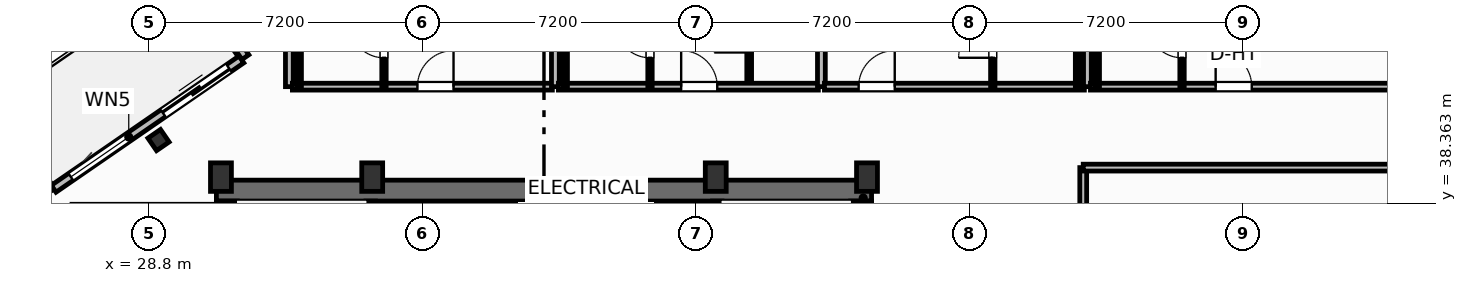
"""IFC4 building model, lengths in metres.
Left out: names, types, materials, properties, quantities, classifications, styles, units other than length and angle.
Written with IfcOpenShell. Run it as: python <this file> out.ifc"""

import sys

from ifc_helpers import new_model, si_unit, direction, frame, frame_2d, origin, origin_2d, place, context, subcontext, project, spatial, rectangle, i_section, extrude, element, fill, save


model = new_model("IFC4")
c1 = context("Model", 3, precision=1e-05, world=origin(), true_north=direction((0.0, 1.0)))
c2 = subcontext(c1, "Body", "Model", "MODEL_VIEW")
j1 = project(units=[si_unit("LENGTHUNIT", "METRE"), si_unit("PLANEANGLEUNIT", "RADIAN")], contexts=[c1])
p1 = place(None, origin())
s1 = spatial("IfcSite", under=j1, at=p1, CompositionType="ELEMENT")
p2 = place(p1, origin())
s2 = spatial("IfcBuilding", under=s1, at=p2, CompositionType="ELEMENT")
p3 = place(p2, frame((0.0, 0.0, 280.4)))
s3 = spatial("IfcBuildingStorey", under=s2, at=p3, CompositionType="ELEMENT", Elevation=280.4)
for number, where, z_axis, x_axis in (
    (1, (30.7, 39.05, 0.0), (0.0, 0.0, 1.0), (1.0, 0.0, 0.0)),
    (2, (34.68, 39.05, 0.0), (0.0, 0.0, 1.0), (1.0, 0.0, 0.0)),
    (3, (43.72, 39.05, 0.0), (0.0, 0.0, 1.0), (1.0, 0.0, 0.0)),
    (4, (47.7, 39.05, 0.0), (0.0, 0.0, 1.0), (1.0, 0.0, 0.0)),
):
    element("IfcColumn", number, at=place(p3, frame(where, z_axis=z_axis, x_axis=x_axis)), inside=s3, PredefinedType="COLUMN", context=c2, shape_type="SweptSolid", body=[
        extrude(rectangle(XDim=0.55, YDim=0.75, at=origin_2d()), origin(), (0.0, 0.0, 1.0), 3.7),
    ])
p4 = place(p3, frame((30.58, 38.695, 0.0), z_axis=(0.0, 0.0, 1.0), x_axis=(1.0, 0.0, 0.0)))
e5 = element("IfcWall", 5, at=p4, inside=s3, PredefinedType="SHEAR", context=c2, shape_type="SweptSolid", body=[
    extrude(rectangle(XDim=17.24, YDim=0.55, at=frame_2d((8.62, 0.0))), origin(), (0.0, 0.0, 1.0), 3.45),
])
for number, where, z_axis, x_axis in (
    (6, (30.855, 29.2, 0.0), (0.0, 0.0, 1.0), (0.0, 1.0, 0.0)),
    (7, (47.545, 29.2, 0.0), (0.0, 0.0, 1.0), (0.0, 1.0, 0.0)),
):
    element("IfcWall", number, at=place(p3, frame(where, z_axis=z_axis, x_axis=x_axis)), inside=s3, PredefinedType="SHEAR", context=c2, shape_type="SweptSolid", body=[
        extrude(rectangle(XDim=9.22, YDim=0.55, at=frame_2d((4.61, 0.0))), origin(), (0.0, 0.0, 1.0), 3.45),
    ])
p5 = place(p3, frame((34.64, 29.2, 0.0), z_axis=(0.0, 0.0, 1.0), x_axis=(0.0, 1.0, 0.0)))
e8 = element("IfcWall", 8, at=p5, inside=s3, PredefinedType="SHEAR", context=c2, shape_type="SweptSolid", body=[
    extrude(rectangle(XDim=9.22, YDim=0.25, at=frame_2d((4.61, 0.0))), origin(), (0.0, 0.0, 1.0), 3.45),
])
p6 = place(p5, frame((0.65, 0.0, 0.0)))
e9 = element("IfcOpeningElement", 9, at=p6, cuts=e8, PredefinedType="OPENING", context=c2, shape_type="SweptSolid", body=[
    extrude(rectangle(XDim=1.05, YDim=2.15, at=frame_2d((0.525, 1.075))), frame((0.0, 0.135, 0.0), z_axis=(0.0, -1.0, 0.0), x_axis=(1.0, 0.0, 0.0)), (0.0, 0.0, 1.0), 0.27),
])
p7 = place(p3, frame((43.76, 29.2, 0.0), z_axis=(0.0, 0.0, 1.0), x_axis=(0.0, 1.0, 0.0)))
e10 = element("IfcWall", 10, at=p7, inside=s3, PredefinedType="SHEAR", context=c2, shape_type="SweptSolid", body=[
    extrude(rectangle(XDim=9.22, YDim=0.25, at=frame_2d((4.61, 0.0))), origin(), (0.0, 0.0, 1.0), 3.45),
])
p8 = place(p7, frame((0.65, 0.0, 0.0)))
e11 = element("IfcOpeningElement", 11, at=p8, cuts=e10, PredefinedType="OPENING", context=c2, shape_type="SweptSolid", body=[
    extrude(rectangle(XDim=1.05, YDim=2.15, at=frame_2d((0.525, 1.075))), frame((0.0, 0.135, 0.0), z_axis=(0.0, -1.0, 0.0), x_axis=(1.0, 0.0, 0.0)), (0.0, 0.0, 1.0), 0.27),
])
p9 = place(p3, frame((29.057, 40.025, 0.0), z_axis=(0.0, 0.0, 1.0), x_axis=(0.823532597628, 0.567268949127, 0.0)))
e12 = element("IfcColumn", 12, at=p9, inside=s3, PredefinedType="COLUMN", context=c2, shape_type="SweptSolid", body=[
    extrude(i_section(OverallWidth=0.401, OverallDepth=0.399, WebThickness=0.025, FlangeThickness=0.04, FilletRadius=0.022, at=origin_2d()), origin(), (0.0, 0.0, 1.0), 3.7),
])
p10 = place(p3, frame((26.297, 38.743, 0.0), z_axis=(0.0, 0.0, 1.0), x_axis=(0.823534636215, 0.567265989598, 0.0)))
e13 = element("IfcWall", 13, at=p10, inside=s3, PredefinedType="SOLIDWALL", context=c2, shape_type="SweptSolid", body=[
    extrude(rectangle(XDim=6.0, YDim=0.22, at=frame_2d((3.0, 0.0))), origin(), (0.0, 0.0, 1.0), 2.73),
])
p11 = place(p10, frame((3.5, 0.0, 0.0)))
e14 = element("IfcOpeningElement", 14, at=p11, cuts=e13, PredefinedType="OPENING", context=c2, shape_type="SweptSolid", body=[
    extrude(rectangle(XDim=2.1, YDim=2.3, at=frame_2d((1.05, 1.15))), frame((0.0, 0.12, 0.0), z_axis=(0.0, -1.0, 0.0), x_axis=(1.0, 0.0, 0.0)), (0.0, 0.0, 1.0), 0.24),
])
p12 = place(p10, frame((0.55, 0.0, 0.75)))
e15 = element("IfcOpeningElement", 15, at=p12, cuts=e13, PredefinedType="OPENING", context=c2, shape_type="SweptSolid", body=[
    extrude(rectangle(XDim=1.85, YDim=1.75, at=frame_2d((0.925, 0.875))), frame((0.0, 0.12, 0.0), z_axis=(0.0, -1.0, 0.0), x_axis=(1.0, 0.0, 0.0)), (0.0, 0.0, 1.0), 0.24),
])
p13 = place(p3, frame((30.223, 43.833, 0.0), z_axis=(0.0, 0.0, 1.0), x_axis=(0.567215821234, -0.823569190865, 0.0)))
e16 = element("IfcWall", 16, at=p13, inside=s3, PredefinedType="SOLIDWALL", context=c2, shape_type="SweptSolid", body=[
    extrude(rectangle(XDim=1.975, YDim=0.22, at=frame_2d((0.988, 0.0))), origin(), (0.0, 0.0, 1.0), 2.73),
])
p14 = place(p3, frame((26.204, 38.667, 0.0), z_axis=(0.0, 0.0, 1.0), x_axis=(-0.567219383419, 0.823566737474, 0.0)))
e17 = element("IfcWall", 17, at=p14, inside=s3, PredefinedType="SOLIDWALL", context=c2, shape_type="SweptSolid", body=[
    extrude(rectangle(XDim=2.1, YDim=0.22, at=frame_2d((1.05, 0.0))), origin(), (0.0, 0.0, 1.0), 2.73),
])
p15 = place(p3, frame((32.5, 41.43, 0.0), z_axis=(0.0, 0.0, 1.0), x_axis=(0.0, 1.0, 0.0)))
e18 = element("IfcWall", 18, at=p15, inside=s3, PredefinedType="PARTITIONING", context=c2, shape_type="SweptSolid", body=[
    extrude(rectangle(XDim=4.099, YDim=0.205, at=frame_2d((2.05, 0.0))), origin(), (0.0, 0.0, 1.0), 3.45),
])
p16 = place(p3, frame((32.58, 41.43, 0.0), z_axis=(0.0, 0.0, 1.0), x_axis=(1.0, 0.0, 0.0)))
e19 = element("IfcWall", 19, at=p16, inside=s3, PredefinedType="PARTITIONING", context=c2, shape_type="SweptSolid", body=[
    extrude(rectangle(XDim=6.84, YDim=0.18, at=frame_2d((3.42, 0.0))), origin(), (0.0, 0.0, 1.0), 3.45),
])
p17 = place(p16, frame((3.29, 0.0, 0.0)))
e20 = element("IfcOpeningElement", 20, at=p17, cuts=e19, PredefinedType="OPENING", context=c2, shape_type="SweptSolid", body=[
    extrude(rectangle(XDim=0.95, YDim=2.15, at=frame_2d((0.475, 1.075))), frame((0.0, 0.1, 0.0), z_axis=(0.0, -1.0, 0.0), x_axis=(1.0, 0.0, 0.0)), (0.0, 0.0, 1.0), 0.2),
])
p18 = place(p3, frame((34.99, 41.43, 0.0), z_axis=(0.0, 0.0, 1.0), x_axis=(0.0, 1.0, 0.0)))
e21 = element("IfcWall", 21, at=p18, inside=s3, PredefinedType="PARTITIONING", context=c2, shape_type="SweptSolid", body=[
    extrude(rectangle(XDim=2.52, YDim=0.115, at=frame_2d((1.26, 0.0))), origin(), (0.0, 0.0, 1.0), 3.45),
])
p19 = place(p18, frame((0.76, 0.0, 0.0)))
e22 = element("IfcOpeningElement", 22, at=p19, cuts=e21, PredefinedType="OPENING", context=c2, shape_type="SweptSolid", body=[
    extrude(rectangle(XDim=0.9, YDim=2.05, at=frame_2d((0.45, 1.025))), frame((0.0, 0.067, 0.0), z_axis=(0.0, -1.0, 0.0), x_axis=(1.0, 0.0, 0.0)), (0.0, 0.0, 1.0), 0.135),
])
p20 = place(p3, frame((32.76, 41.43, 0.0), z_axis=(0.0, 0.0, 1.0), x_axis=(0.0, 1.0, 0.0)))
e23 = element("IfcWall", 23, at=p20, inside=s3, PredefinedType="PARTITIONING", context=c2, shape_type="SweptSolid", body=[
    extrude(rectangle(XDim=2.52, YDim=0.115, at=frame_2d((1.26, 0.0))), origin(), (0.0, 0.0, 1.0), 3.45),
])
p21 = place(p3, frame((39.5, 41.43, 0.0), z_axis=(0.0, 0.0, 1.0), x_axis=(0.0, 1.0, 0.0)))
e24 = element("IfcWall", 24, at=p21, inside=s3, PredefinedType="PARTITIONING", context=c2, shape_type="SweptSolid", body=[
    extrude(rectangle(XDim=6.371, YDim=0.205, at=frame_2d((3.186, 0.0))), origin(), (0.0, 0.0, 1.0), 3.45),
])
p22 = place(p3, frame((44.6, 41.43, 0.0), z_axis=(0.0, 0.0, 1.0), x_axis=(0.0, 1.0, 0.0)))
e25 = element("IfcWall", 25, at=p22, inside=s3, PredefinedType="PARTITIONING", context=c2, shape_type="SweptSolid", body=[
    extrude(rectangle(XDim=12.434, YDim=0.125, at=frame_2d((6.217, 0.0))), origin(), (0.0, 0.0, 1.0), 3.45),
])
p23 = place(p22, frame((0.9, 0.0, 0.0)))
e26 = element("IfcOpeningElement", 26, at=p23, cuts=e25, PredefinedType="OPENING", context=c2, shape_type="SweptSolid", body=[
    extrude(rectangle(XDim=0.92, YDim=2.05, at=frame_2d((0.46, 1.025))), frame((0.0, 0.073, 0.0), z_axis=(0.0, -1.0, 0.0), x_axis=(1.0, 0.0, 0.0)), (0.0, 0.0, 1.0), 0.145),
])
p24 = place(p3, frame((39.58, 41.43, 0.0), z_axis=(0.0, 0.0, 1.0), x_axis=(1.0, 0.0, 0.0)))
e27 = element("IfcWall", 27, at=p24, inside=s3, PredefinedType="PARTITIONING", context=c2, shape_type="SweptSolid", body=[
    extrude(rectangle(XDim=6.84, YDim=0.18, at=frame_2d((3.42, 0.0))), origin(), (0.0, 0.0, 1.0), 3.45),
])
p25 = place(p24, frame((3.23, 0.0, 0.0)))
e28 = element("IfcOpeningElement", 28, at=p25, cuts=e27, PredefinedType="OPENING", context=c2, shape_type="SweptSolid", body=[
    extrude(rectangle(XDim=0.95, YDim=2.15, at=frame_2d((0.475, 1.075))), frame((0.0, 0.1, 0.0), z_axis=(0.0, -1.0, 0.0), x_axis=(1.0, 0.0, 0.0)), (0.0, 0.0, 1.0), 0.2),
])
p26 = place(p3, frame((41.99, 41.43, 0.0), z_axis=(0.0, 0.0, 1.0), x_axis=(0.0, 1.0, 0.0)))
e29 = element("IfcWall", 29, at=p26, inside=s3, PredefinedType="PARTITIONING", context=c2, shape_type="SweptSolid", body=[
    extrude(rectangle(XDim=2.52, YDim=0.115, at=frame_2d((1.26, 0.0))), origin(), (0.0, 0.0, 1.0), 3.45),
])
p27 = place(p26, frame((0.76, 0.0, 0.0)))
e30 = element("IfcOpeningElement", 30, at=p27, cuts=e29, PredefinedType="OPENING", context=c2, shape_type="SweptSolid", body=[
    extrude(rectangle(XDim=0.9, YDim=2.05, at=frame_2d((0.45, 1.025))), frame((0.0, 0.067, 0.0), z_axis=(0.0, -1.0, 0.0), x_axis=(1.0, 0.0, 0.0)), (0.0, 0.0, 1.0), 0.135),
])
p28 = place(p3, frame((39.76, 41.43, 0.0), z_axis=(0.0, 0.0, 1.0), x_axis=(0.0, 1.0, 0.0)))
e31 = element("IfcWall", 31, at=p28, inside=s3, PredefinedType="PARTITIONING", context=c2, shape_type="SweptSolid", body=[
    extrude(rectangle(XDim=2.52, YDim=0.115, at=frame_2d((1.26, 0.0))), origin(), (0.0, 0.0, 1.0), 3.45),
])
p29 = place(p3, frame((46.5, 41.43, 0.0), z_axis=(0.0, 0.0, 1.0), x_axis=(0.0, 1.0, 0.0)))
e32 = element("IfcWall", 32, at=p29, inside=s3, PredefinedType="PARTITIONING", context=c2, shape_type="SweptSolid", body=[
    extrude(rectangle(XDim=13.743, YDim=0.205, at=frame_2d((6.871, 0.0))), origin(), (0.0, 0.0, 1.0), 3.45),
])
p30 = place(p3, frame((46.58, 41.43, 0.0), z_axis=(0.0, 0.0, 1.0), x_axis=(1.0, 0.0, 0.0)))
e33 = element("IfcWall", 33, at=p30, inside=s3, PredefinedType="PARTITIONING", context=c2, shape_type="SweptSolid", body=[
    extrude(rectangle(XDim=6.84, YDim=0.18, at=frame_2d((3.42, 0.0))), origin(), (0.0, 0.0, 1.0), 3.45),
])
p31 = place(p30, frame((0.9, 0.0, 0.0)))
e34 = element("IfcOpeningElement", 34, at=p31, cuts=e33, PredefinedType="OPENING", context=c2, shape_type="SweptSolid", body=[
    extrude(rectangle(XDim=0.95, YDim=2.15, at=frame_2d((0.475, 1.075))), frame((0.0, 0.1, 0.0), z_axis=(0.0, -1.0, 0.0), x_axis=(1.0, 0.0, 0.0)), (0.0, 0.0, 1.0), 0.2),
])
p32 = place(p3, frame((51.01, 41.43, 0.0), z_axis=(0.0, 0.0, 1.0), x_axis=(0.0, 1.0, 0.0)))
e35 = element("IfcWall", 35, at=p32, inside=s3, PredefinedType="PARTITIONING", context=c2, shape_type="SweptSolid", body=[
    extrude(rectangle(XDim=2.52, YDim=0.115, at=frame_2d((1.26, 0.0))), origin(), (0.0, 0.0, 1.0), 3.45),
])
p33 = place(p32, frame((0.76, 0.0, 0.0)))
e36 = element("IfcOpeningElement", 36, at=p33, cuts=e35, PredefinedType="OPENING", context=c2, shape_type="SweptSolid", body=[
    extrude(rectangle(XDim=0.9, YDim=2.05, at=frame_2d((0.45, 1.025))), frame((0.0, 0.067, 0.0), z_axis=(0.0, -1.0, 0.0), x_axis=(1.0, 0.0, 0.0)), (0.0, 0.0, 1.0), 0.135),
])
p34 = place(p3, frame((53.24, 41.43, 0.0), z_axis=(0.0, 0.0, 1.0), x_axis=(0.0, 1.0, 0.0)))
e37 = element("IfcWall", 37, at=p34, inside=s3, PredefinedType="PARTITIONING", context=c2, shape_type="SweptSolid", body=[
    extrude(rectangle(XDim=2.52, YDim=0.115, at=frame_2d((1.26, 0.0))), origin(), (0.0, 0.0, 1.0), 3.45),
])
p35 = place(p3, frame((53.5, 41.43, 0.0), z_axis=(0.0, 0.0, 1.0), x_axis=(0.0, 1.0, 0.0)))
e38 = element("IfcWall", 38, at=p35, inside=s3, PredefinedType="PARTITIONING", context=c2, shape_type="SweptSolid", body=[
    extrude(rectangle(XDim=14.57, YDim=0.205, at=frame_2d((7.285, 0.0))), origin(), (0.0, 0.0, 1.0), 3.45),
])
p36 = place(p3, frame((53.58, 41.43, 0.0), z_axis=(0.0, 0.0, 1.0), x_axis=(1.0, 0.0, 0.0)))
e39 = element("IfcWall", 39, at=p36, inside=s3, PredefinedType="PARTITIONING", context=c2, shape_type="SweptSolid", body=[
    extrude(rectangle(XDim=14.492, YDim=0.18, at=frame_2d((7.246, 0.0))), origin(), (0.0, 0.0, 1.0), 3.45),
])
p37 = place(p36, frame((3.294, 0.0, 0.0)))
e40 = element("IfcOpeningElement", 40, at=p37, cuts=e39, PredefinedType="OPENING", context=c2, shape_type="SweptSolid", body=[
    extrude(rectangle(XDim=0.95, YDim=2.15, at=frame_2d((0.475, 1.075))), frame((0.0, 0.1, 0.0), z_axis=(0.0, -1.0, 0.0), x_axis=(1.0, 0.0, 0.0)), (0.0, 0.0, 1.0), 0.2),
])
p38 = place(p3, frame((55.99, 41.43, 0.0), z_axis=(0.0, 0.0, 1.0), x_axis=(0.0, 1.0, 0.0)))
e41 = element("IfcWall", 41, at=p38, inside=s3, PredefinedType="PARTITIONING", context=c2, shape_type="SweptSolid", body=[
    extrude(rectangle(XDim=2.52, YDim=0.115, at=frame_2d((1.26, 0.0))), origin(), (0.0, 0.0, 1.0), 3.45),
])
p39 = place(p38, frame((0.76, 0.0, 0.0)))
e42 = element("IfcOpeningElement", 42, at=p39, cuts=e41, PredefinedType="OPENING", context=c2, shape_type="SweptSolid", body=[
    extrude(rectangle(XDim=0.9, YDim=2.05, at=frame_2d((0.45, 1.025))), frame((0.0, 0.067, 0.0), z_axis=(0.0, -1.0, 0.0), x_axis=(1.0, 0.0, 0.0)), (0.0, 0.0, 1.0), 0.135),
])
p40 = place(p3, frame((53.76, 41.43, 0.0), z_axis=(0.0, 0.0, 1.0), x_axis=(0.0, 1.0, 0.0)))
e43 = element("IfcWall", 43, at=p40, inside=s3, PredefinedType="PARTITIONING", context=c2, shape_type="SweptSolid", body=[
    extrude(rectangle(XDim=2.52, YDim=0.115, at=frame_2d((1.26, 0.0))), origin(), (0.0, 0.0, 1.0), 3.45),
])
p41 = place(p3, frame((53.39, 19.24, 0.0), z_axis=(0.0, 0.0, 1.0), x_axis=(0.0, 1.0, 0.0)))
e44 = element("IfcWall", 44, at=p41, inside=s3, PredefinedType="PARTITIONING", context=c2, shape_type="SweptSolid", body=[
    extrude(rectangle(XDim=20.06, YDim=0.18, at=frame_2d((10.03, 0.0))), origin(), (0.0, 0.0, 1.0), 3.45),
])
p42 = place(p41, frame((7.7, 0.0, 0.0)))
e45 = element("IfcOpeningElement", 45, at=p42, cuts=e44, PredefinedType="OPENING", context=c2, shape_type="SweptSolid", body=[
    extrude(rectangle(XDim=0.95, YDim=2.05, at=frame_2d((0.475, 1.025))), frame((0.0, 0.1, 0.0), z_axis=(0.0, -1.0, 0.0), x_axis=(1.0, 0.0, 0.0)), (0.0, 0.0, 1.0), 0.2),
])
p43 = place(p3, frame((53.39, 39.3, 0.0), z_axis=(0.0, 0.0, 1.0), x_axis=(1.0, 0.0, 0.0)))
e46 = element("IfcWall", 46, at=p43, inside=s3, PredefinedType="PARTITIONING", context=c2, shape_type="SweptSolid", body=[
    extrude(rectangle(XDim=16.149, YDim=0.18, at=frame_2d((8.075, 0.0))), origin(), (0.0, 0.0, 1.0), 2.739),
])
p44 = place(p11, origin())
e47 = element("IfcDoor", 47, at=p44, inside=s3, OperationType="SLIDING_TO_LEFT", PredefinedType="DOOR", context=c2, shape_type="SweptSolid", body=[
    extrude(rectangle(XDim=2.1, YDim=2.3, at=frame_2d((1.05, 1.15))), frame((0.0, 0.025, 0.0), z_axis=(0.0, -1.0, 0.0), x_axis=(1.0, 0.0, 0.0)), (0.0, 0.0, 1.0), 0.05),
])
fill(e14, e47)
p45 = place(p12, origin())
e48 = element("IfcWindow", 48, at=p45, inside=s3, PartitioningType="SINGLE_PANEL", PredefinedType="WINDOW", context=c2, shape_type="SweptSolid", body=[
    extrude(rectangle(XDim=1.85, YDim=1.75, at=frame_2d((0.925, 0.875))), frame((0.0, 0.03, 0.0), z_axis=(0.0, -1.0, 0.0), x_axis=(1.0, 0.0, 0.0)), (0.0, 0.0, 1.0), 0.06),
])
fill(e15, e48)
p46 = place(p17, origin())
e49 = element("IfcDoor", 49, at=p46, inside=s3, OperationType="SINGLE_SWING_RIGHT", PredefinedType="DOOR", context=c2, shape_type="SweptSolid", body=[
    extrude(rectangle(XDim=0.95, YDim=2.15, at=frame_2d((0.475, 1.075))), frame((0.0, 0.025, 0.0), z_axis=(0.0, -1.0, 0.0), x_axis=(1.0, 0.0, 0.0)), (0.0, 0.0, 1.0), 0.05),
])
fill(e20, e49)
p47 = place(p19, origin())
e50 = element("IfcDoor", 50, at=p47, inside=s3, OperationType="SINGLE_SWING_RIGHT", PredefinedType="DOOR", context=c2, shape_type="SweptSolid", body=[
    extrude(rectangle(XDim=0.9, YDim=2.05, at=frame_2d((0.45, 1.025))), frame((0.0, 0.025, 0.0), z_axis=(0.0, -1.0, 0.0), x_axis=(1.0, 0.0, 0.0)), (0.0, 0.0, 1.0), 0.05),
])
fill(e22, e50)
p48 = place(p23, origin())
e51 = element("IfcDoor", 51, at=p48, inside=s3, OperationType="SINGLE_SWING_LEFT", PredefinedType="DOOR", context=c2, shape_type="SweptSolid", body=[
    extrude(rectangle(XDim=0.92, YDim=2.05, at=frame_2d((0.46, 1.025))), frame((0.0, 0.025, 0.0), z_axis=(0.0, -1.0, 0.0), x_axis=(1.0, 0.0, 0.0)), (0.0, 0.0, 1.0), 0.05),
])
fill(e26, e51)
p49 = place(p25, origin())
e52 = element("IfcDoor", 52, at=p49, inside=s3, OperationType="SINGLE_SWING_LEFT", PredefinedType="DOOR", context=c2, shape_type="SweptSolid", body=[
    extrude(rectangle(XDim=0.95, YDim=2.15, at=frame_2d((0.475, 1.075))), frame((0.0, 0.025, 0.0), z_axis=(0.0, -1.0, 0.0), x_axis=(1.0, 0.0, 0.0)), (0.0, 0.0, 1.0), 0.05),
])
fill(e28, e52)
p50 = place(p27, origin())
e53 = element("IfcDoor", 53, at=p50, inside=s3, OperationType="SINGLE_SWING_RIGHT", PredefinedType="DOOR", context=c2, shape_type="SweptSolid", body=[
    extrude(rectangle(XDim=0.9, YDim=2.05, at=frame_2d((0.45, 1.025))), frame((0.0, 0.025, 0.0), z_axis=(0.0, -1.0, 0.0), x_axis=(1.0, 0.0, 0.0)), (0.0, 0.0, 1.0), 0.05),
])
fill(e30, e53)
p51 = place(p31, origin())
e54 = element("IfcDoor", 54, at=p51, inside=s3, OperationType="SINGLE_SWING_RIGHT", PredefinedType="DOOR", context=c2, shape_type="SweptSolid", body=[
    extrude(rectangle(XDim=0.95, YDim=2.15, at=frame_2d((0.475, 1.075))), frame((0.0, 0.025, 0.0), z_axis=(0.0, -1.0, 0.0), x_axis=(1.0, 0.0, 0.0)), (0.0, 0.0, 1.0), 0.05),
])
fill(e34, e54)
p52 = place(p33, origin())
e55 = element("IfcDoor", 55, at=p52, inside=s3, OperationType="SINGLE_SWING_LEFT", PredefinedType="DOOR", context=c2, shape_type="SweptSolid", body=[
    extrude(rectangle(XDim=0.9, YDim=2.05, at=frame_2d((0.45, 1.025))), frame((0.0, 0.025, 0.0), z_axis=(0.0, -1.0, 0.0), x_axis=(1.0, 0.0, 0.0)), (0.0, 0.0, 1.0), 0.05),
])
fill(e36, e55)
p53 = place(p37, origin())
e56 = element("IfcDoor", 56, at=p53, inside=s3, OperationType="SINGLE_SWING_LEFT", PredefinedType="DOOR", context=c2, shape_type="SweptSolid", body=[
    extrude(rectangle(XDim=0.95, YDim=2.15, at=frame_2d((0.475, 1.075))), frame((0.0, 0.025, 0.0), z_axis=(0.0, -1.0, 0.0), x_axis=(1.0, 0.0, 0.0)), (0.0, 0.0, 1.0), 0.05),
])
fill(e40, e56)
p54 = place(p39, origin())
e57 = element("IfcDoor", 57, at=p54, inside=s3, OperationType="SINGLE_SWING_RIGHT", PredefinedType="DOOR", context=c2, shape_type="SweptSolid", body=[
    extrude(rectangle(XDim=0.9, YDim=2.05, at=frame_2d((0.45, 1.025))), frame((0.0, 0.025, 0.0), z_axis=(0.0, -1.0, 0.0), x_axis=(1.0, 0.0, 0.0)), (0.0, 0.0, 1.0), 0.05),
])
fill(e42, e57)
save(model, sys.argv[1])
